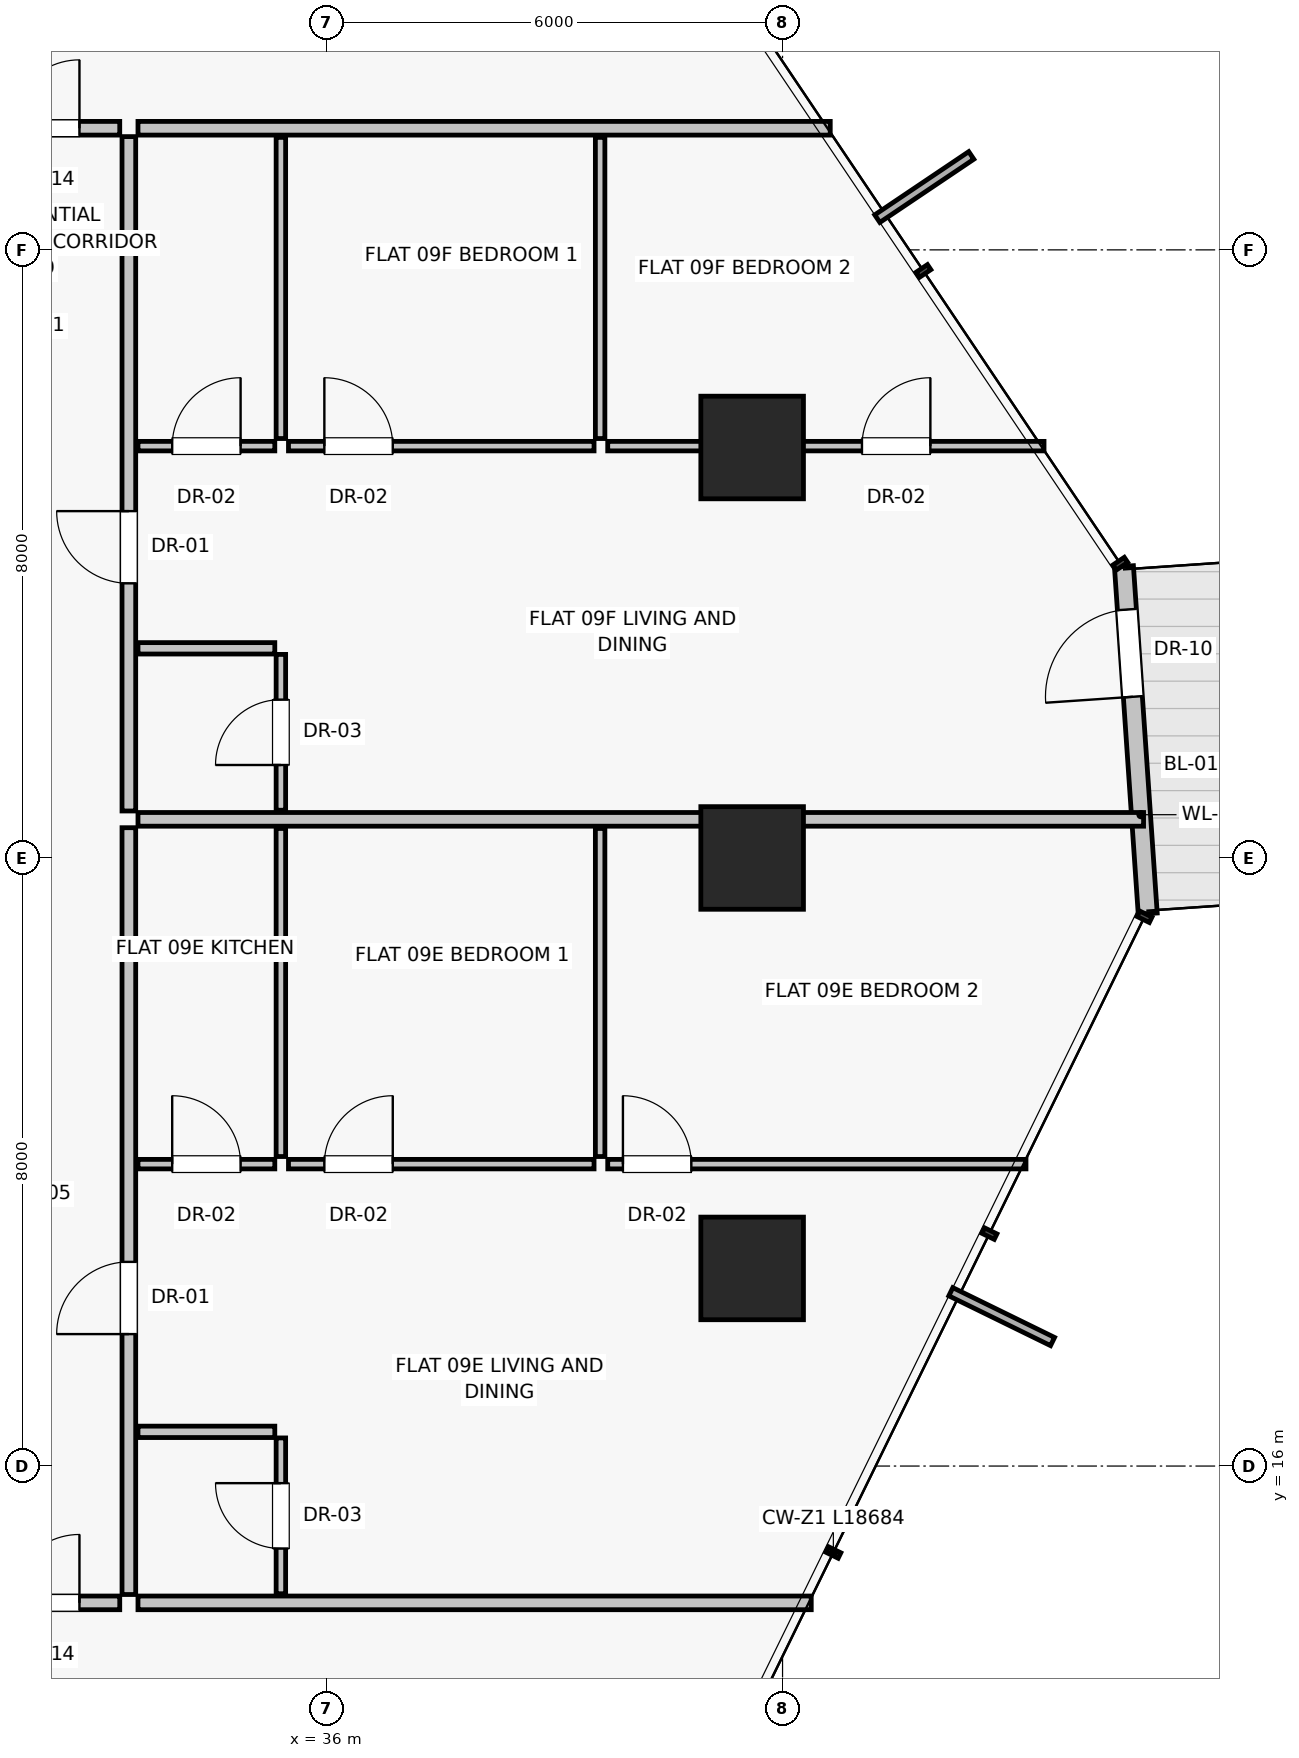
"""IFC4 building model, lengths in metres.
Left out: names, types, materials, properties, quantities, classifications, styles, units other than length and angle.
Written with IfcOpenShell. Run it as: python <this file> out.ifc"""

import sys

from ifc_helpers import new_model, si_unit, direction, frame, frame_2d, origin, origin_2d, place, context, subcontext, project, spatial, rectangle, extrude, source, transform, mapped, element, fill, save


model = new_model("IFC4")
c1 = context("Model", 3, precision=1e-05, world=origin(), true_north=direction((0.0, 1.0)))
c2 = subcontext(c1, "Body", "Model", "MODEL_VIEW")
j1 = project(units=[si_unit("LENGTHUNIT", "METRE"), si_unit("PLANEANGLEUNIT", "RADIAN")], contexts=[c1])
p1 = place(None, origin())
s1 = spatial("IfcSite", under=j1, at=p1, CompositionType="ELEMENT")
p2 = place(p1, origin())
s2 = spatial("IfcBuilding", under=s1, at=p2, CompositionType="ELEMENT")
p3 = place(p2, frame((0.0, 0.0, 37.05)))
s3 = spatial("IfcBuildingStorey", under=s2, at=p3, CompositionType="ELEMENT", Elevation=37.05)
for number, where, z_axis, x_axis in (
    (1, (41.6, 18.6, 0.0), (0.0, 0.0, 1.0), (1.0, 0.0, 0.0)),
    (2, (41.6, 24.0, 0.0), (0.0, 0.0, 1.0), (1.0, 0.0, 0.0)),
    (3, (41.6, 29.4, 0.0), (0.0, 0.0, 1.0), (1.0, 0.0, 0.0)),
):
    element("IfcColumn", number, at=place(p3, frame(where, z_axis=z_axis, x_axis=x_axis)), inside=s3, PredefinedType="COLUMN", context=c2, shape_type="SweptSolid", body=[
        extrude(rectangle(XDim=1.35, YDim=1.35, at=origin_2d()), origin(), (0.0, 0.0, 1.0), 3.25),
    ])
p4 = place(p3, frame((46.804, 23.267, 0.0), z_axis=(0.0, 0.0, 1.0), x_axis=(-0.068390469298, 0.99765863085, 0.0)))
e4 = element("IfcWall", 4, at=p4, inside=s3, PredefinedType="SOLIDWALL", context=c2, shape_type="SweptSolid", body=[
    extrude(rectangle(XDim=4.58, YDim=0.25, at=frame_2d((2.29, 0.0))), origin(), (0.0, 0.0, 1.0), 3.0),
])
p5 = place(p4, frame((2.86, 0.0, 0.0)))
e5 = element("IfcOpeningElement", 5, at=p5, cuts=e4, PredefinedType="OPENING", context=c2, shape_type="SweptSolid", body=[
    extrude(rectangle(XDim=1.15, YDim=2.25, at=frame_2d((0.575, 1.125))), frame((0.0, 0.135, 0.0), z_axis=(0.0, -1.0, 0.0), x_axis=(1.0, 0.0, 0.0)), (0.0, 0.0, 1.0), 0.27),
])
p6 = place(p3, frame((33.52, 14.2, 0.0), z_axis=(0.0, 0.0, 1.0), x_axis=(1.0, 0.0, 0.0)))
e6 = element("IfcWall", 6, at=p6, inside=s3, PredefinedType="PARTITIONING", context=c2, shape_type="SweptSolid", body=[
    extrude(rectangle(XDim=8.857, YDim=0.18, at=frame_2d((4.429, 0.0))), origin(), (0.0, 0.0, 1.0), 3.0),
])
p7 = place(p3, frame((33.52, 33.6, 0.0), z_axis=(0.0, 0.0, 1.0), x_axis=(1.0, 0.0, 0.0)))
e7 = element("IfcWall", 7, at=p7, inside=s3, PredefinedType="PARTITIONING", context=c2, shape_type="SweptSolid", body=[
    extrude(rectangle(XDim=9.107, YDim=0.18, at=frame_2d((4.554, 0.0))), origin(), (0.0, 0.0, 1.0), 3.0),
])
p8 = place(p3, frame((33.4, 14.31, 0.0), z_axis=(0.0, 0.0, 1.0), x_axis=(0.0, 1.0, 0.0)))
e8 = element("IfcWall", 8, at=p8, inside=s3, PredefinedType="PARTITIONING", context=c2, shape_type="SweptSolid", body=[
    extrude(rectangle(XDim=10.088, YDim=0.18, at=frame_2d((5.044, 0.0))), origin(), (0.0, 0.0, 1.0), 3.0),
])
p9 = place(p8, frame((3.426, 0.0, 0.0)))
e9 = element("IfcOpeningElement", 9, at=p9, cuts=e8, PredefinedType="OPENING", context=c2, shape_type="SweptSolid", body=[
    extrude(rectangle(XDim=0.95, YDim=2.02, at=frame_2d((0.475, 1.01))), frame((0.0, 0.1, 0.0), z_axis=(0.0, -1.0, 0.0), x_axis=(1.0, 0.0, 0.0)), (0.0, 0.0, 1.0), 0.2),
])
p10 = place(p3, frame((33.52, 16.45, 0.0), z_axis=(0.0, 0.0, 1.0), x_axis=(1.0, 0.0, 0.0)))
e10 = element("IfcWall", 10, at=p10, inside=s3, PredefinedType="PARTITIONING", context=c2, shape_type="SweptSolid", body=[
    extrude(rectangle(XDim=1.8, YDim=0.15, at=frame_2d((0.9, 0.0))), origin(), (0.0, 0.0, 1.0), 3.0),
])
p11 = place(p3, frame((35.4, 14.32, 0.0), z_axis=(0.0, 0.0, 1.0), x_axis=(0.0, 1.0, 0.0)))
e11 = element("IfcWall", 11, at=p11, inside=s3, PredefinedType="PARTITIONING", context=c2, shape_type="SweptSolid", body=[
    extrude(rectangle(XDim=2.05, YDim=0.125, at=frame_2d((1.025, 0.0))), origin(), (0.0, 0.0, 1.0), 3.0),
])
p12 = place(p11, frame((0.595, 0.0, 0.0)))
e12 = element("IfcOpeningElement", 12, at=p12, cuts=e11, PredefinedType="OPENING", context=c2, shape_type="SweptSolid", body=[
    extrude(rectangle(XDim=0.86, YDim=2.01, at=frame_2d((0.43, 1.005))), frame((0.0, 0.073, 0.0), z_axis=(0.0, -1.0, 0.0), x_axis=(1.0, 0.0, 0.0)), (0.0, 0.0, 1.0), 0.145),
])
p13 = place(p3, frame((33.52, 19.972, 0.0), z_axis=(0.0, 0.0, 1.0), x_axis=(1.0, 0.0, 0.0)))
e13 = element("IfcWall", 13, at=p13, inside=s3, PredefinedType="PARTITIONING", context=c2, shape_type="SweptSolid", body=[
    extrude(rectangle(XDim=1.8, YDim=0.125, at=frame_2d((0.9, 0.0))), origin(), (0.0, 0.0, 1.0), 3.0),
])
p14 = place(p13, frame((0.45, 0.0, 0.0)))
e14 = element("IfcOpeningElement", 14, at=p14, cuts=e13, PredefinedType="OPENING", context=c2, shape_type="SweptSolid", body=[
    extrude(rectangle(XDim=0.9, YDim=2.01, at=frame_2d((0.45, 1.005))), frame((0.0, 0.073, 0.0), z_axis=(0.0, -1.0, 0.0), x_axis=(1.0, 0.0, 0.0)), (0.0, 0.0, 1.0), 0.145),
])
for number, where, z_axis, x_axis in (
    (15, (35.4, 20.072, 0.0), (0.0, 0.0, 1.0), (0.0, 1.0, 0.0)),
    (16, (39.6, 20.072, 0.0), (0.0, 0.0, 1.0), (0.0, 1.0, 0.0)),
):
    element("IfcWall", number, at=place(p3, frame(where, z_axis=z_axis, x_axis=x_axis)), inside=s3, PredefinedType="PARTITIONING", context=c2, shape_type="SweptSolid", body=[
        extrude(rectangle(XDim=4.316, YDim=0.125, at=frame_2d((2.158, 0.0))), origin(), (0.0, 0.0, 1.0), 3.0),
    ])
p15 = place(p3, frame((35.5, 19.972, 0.0), z_axis=(0.0, 0.0, 1.0), x_axis=(1.0, 0.0, 0.0)))
e17 = element("IfcWall", 17, at=p15, inside=s3, PredefinedType="PARTITIONING", context=c2, shape_type="SweptSolid", body=[
    extrude(rectangle(XDim=4.02, YDim=0.125, at=frame_2d((2.01, 0.0))), origin(), (0.0, 0.0, 1.0), 3.0),
])
p16 = place(p15, frame((0.472, 0.0, 0.0)))
e18 = element("IfcOpeningElement", 18, at=p16, cuts=e17, PredefinedType="OPENING", context=c2, shape_type="SweptSolid", body=[
    extrude(rectangle(XDim=0.9, YDim=2.01, at=frame_2d((0.45, 1.005))), frame((0.0, 0.073, 0.0), z_axis=(0.0, -1.0, 0.0), x_axis=(1.0, 0.0, 0.0)), (0.0, 0.0, 1.0), 0.145),
])
p17 = place(p3, frame((39.7, 19.972, 0.0), z_axis=(0.0, 0.0, 1.0), x_axis=(1.0, 0.0, 0.0)))
e19 = element("IfcWall", 19, at=p17, inside=s3, PredefinedType="PARTITIONING", context=c2, shape_type="SweptSolid", body=[
    extrude(rectangle(XDim=5.503, YDim=0.125, at=frame_2d((2.751, 0.0))), origin(), (0.0, 0.0, 1.0), 3.0),
])
p18 = place(p17, frame((0.2, 0.0, 0.0)))
e20 = element("IfcOpeningElement", 20, at=p18, cuts=e19, PredefinedType="OPENING", context=c2, shape_type="SweptSolid", body=[
    extrude(rectangle(XDim=0.9, YDim=2.01, at=frame_2d((0.45, 1.005))), frame((0.0, 0.073, 0.0), z_axis=(0.0, -1.0, 0.0), x_axis=(1.0, 0.0, 0.0)), (0.0, 0.0, 1.0), 0.145),
])
p19 = place(p3, frame((33.52, 24.508, 0.0), z_axis=(0.0, 0.0, 1.0), x_axis=(1.0, 0.0, 0.0)))
e21 = element("IfcWall", 21, at=p19, inside=s3, PredefinedType="PARTITIONING", context=c2, shape_type="SweptSolid", body=[
    extrude(rectangle(XDim=13.229, YDim=0.18, at=frame_2d((6.615, 0.0))), origin(), (0.0, 0.0, 1.0), 3.0),
])
p20 = place(p3, frame((33.4, 24.618, 0.0), z_axis=(0.0, 0.0, 1.0), x_axis=(0.0, 1.0, 0.0)))
e22 = element("IfcWall", 22, at=p20, inside=s3, PredefinedType="PARTITIONING", context=c2, shape_type="SweptSolid", body=[
    extrude(rectangle(XDim=8.872, YDim=0.18, at=frame_2d((4.436, 0.0))), origin(), (0.0, 0.0, 1.0), 3.0),
])
p21 = place(p20, frame((2.995, 0.0, 0.0)))
e23 = element("IfcOpeningElement", 23, at=p21, cuts=e22, PredefinedType="OPENING", context=c2, shape_type="SweptSolid", body=[
    extrude(rectangle(XDim=0.95, YDim=2.02, at=frame_2d((0.475, 1.01))), frame((0.0, 0.1, 0.0), z_axis=(0.0, -1.0, 0.0), x_axis=(1.0, 0.0, 0.0)), (0.0, 0.0, 1.0), 0.2),
])
p22 = place(p3, frame((33.52, 26.758, 0.0), z_axis=(0.0, 0.0, 1.0), x_axis=(1.0, 0.0, 0.0)))
e24 = element("IfcWall", 24, at=p22, inside=s3, PredefinedType="PARTITIONING", context=c2, shape_type="SweptSolid", body=[
    extrude(rectangle(XDim=1.8, YDim=0.15, at=frame_2d((0.9, 0.0))), origin(), (0.0, 0.0, 1.0), 3.0),
])
p23 = place(p3, frame((35.4, 24.628, 0.0), z_axis=(0.0, 0.0, 1.0), x_axis=(0.0, 1.0, 0.0)))
e25 = element("IfcWall", 25, at=p23, inside=s3, PredefinedType="PARTITIONING", context=c2, shape_type="SweptSolid", body=[
    extrude(rectangle(XDim=2.05, YDim=0.125, at=frame_2d((1.025, 0.0))), origin(), (0.0, 0.0, 1.0), 3.0),
])
p24 = place(p23, frame((0.595, 0.0, 0.0)))
e26 = element("IfcOpeningElement", 26, at=p24, cuts=e25, PredefinedType="OPENING", context=c2, shape_type="SweptSolid", body=[
    extrude(rectangle(XDim=0.86, YDim=2.01, at=frame_2d((0.43, 1.005))), frame((0.0, 0.073, 0.0), z_axis=(0.0, -1.0, 0.0), x_axis=(1.0, 0.0, 0.0)), (0.0, 0.0, 1.0), 0.145),
])
p25 = place(p3, frame((33.52, 29.418, 0.0), z_axis=(0.0, 0.0, 1.0), x_axis=(1.0, 0.0, 0.0)))
e27 = element("IfcWall", 27, at=p25, inside=s3, PredefinedType="PARTITIONING", context=c2, shape_type="SweptSolid", body=[
    extrude(rectangle(XDim=1.8, YDim=0.125, at=frame_2d((0.9, 0.0))), origin(), (0.0, 0.0, 1.0), 3.0),
])
p26 = place(p25, frame((0.45, 0.0, 0.0)))
e28 = element("IfcOpeningElement", 28, at=p26, cuts=e27, PredefinedType="OPENING", context=c2, shape_type="SweptSolid", body=[
    extrude(rectangle(XDim=0.9, YDim=2.01, at=frame_2d((0.45, 1.005))), frame((0.0, 0.073, 0.0), z_axis=(0.0, -1.0, 0.0), x_axis=(1.0, 0.0, 0.0)), (0.0, 0.0, 1.0), 0.145),
])
for number, where, z_axis, x_axis in (
    (29, (35.4, 29.518, 0.0), (0.0, 0.0, 1.0), (0.0, 1.0, 0.0)),
    (30, (39.6, 29.518, 0.0), (0.0, 0.0, 1.0), (0.0, 1.0, 0.0)),
):
    element("IfcWall", number, at=place(p3, frame(where, z_axis=z_axis, x_axis=x_axis)), inside=s3, PredefinedType="PARTITIONING", context=c2, shape_type="SweptSolid", body=[
        extrude(rectangle(XDim=3.962, YDim=0.125, at=frame_2d((1.981, 0.0))), origin(), (0.0, 0.0, 1.0), 3.0),
    ])
p27 = place(p3, frame((35.5, 29.418, 0.0), z_axis=(0.0, 0.0, 1.0), x_axis=(1.0, 0.0, 0.0)))
e31 = element("IfcWall", 31, at=p27, inside=s3, PredefinedType="PARTITIONING", context=c2, shape_type="SweptSolid", body=[
    extrude(rectangle(XDim=4.02, YDim=0.125, at=frame_2d((2.01, 0.0))), origin(), (0.0, 0.0, 1.0), 2.299),
])
p28 = place(p27, frame((0.472, 0.0, 0.0)))
e32 = element("IfcOpeningElement", 32, at=p28, cuts=e31, PredefinedType="OPENING", context=c2, shape_type="SweptSolid", body=[
    extrude(rectangle(XDim=0.9, YDim=2.01, at=frame_2d((0.45, 1.005))), frame((0.0, 0.073, 0.0), z_axis=(0.0, -1.0, 0.0), x_axis=(1.0, 0.0, 0.0)), (0.0, 0.0, 1.0), 0.145),
])
p29 = place(p3, frame((39.7, 29.418, 0.0), z_axis=(0.0, 0.0, 1.0), x_axis=(1.0, 0.0, 0.0)))
e33 = element("IfcWall", 33, at=p29, inside=s3, PredefinedType="PARTITIONING", context=c2, shape_type="SweptSolid", body=[
    extrude(rectangle(XDim=5.74, YDim=0.125, at=frame_2d((2.87, 0.0))), origin(), (0.0, 0.0, 1.0), 2.299),
])
p30 = place(p29, frame((3.345, 0.0, 0.0)))
e34 = element("IfcOpeningElement", 34, at=p30, cuts=e33, PredefinedType="OPENING", context=c2, shape_type="SweptSolid", body=[
    extrude(rectangle(XDim=0.9, YDim=2.01, at=frame_2d((0.45, 1.005))), frame((0.0, 0.073, 0.0), z_axis=(0.0, -1.0, 0.0), x_axis=(1.0, 0.0, 0.0)), (0.0, 0.0, 1.0), 0.145),
])
p31 = place(p3, frame((31.32, 14.2, 0.0), z_axis=(0.0, 0.0, 1.0), x_axis=(1.0, 0.0, 0.0)))
e35 = element("IfcWall", 35, at=p31, inside=s3, PredefinedType="PARTITIONING", context=c2, shape_type="SweptSolid", body=[
    extrude(rectangle(XDim=1.96, YDim=0.18, at=frame_2d((0.98, 0.0))), origin(), (0.0, 0.0, 1.0), 3.0),
])
p32 = place(p31, frame((0.53, 0.0, 0.0)))
e36 = element("IfcOpeningElement", 36, at=p32, cuts=e35, PredefinedType="OPENING", context=c2, shape_type="SweptSolid", body=[
    extrude(rectangle(XDim=0.9, YDim=2.01, at=frame_2d((0.45, 1.005))), frame((0.0, 0.1, 0.0), z_axis=(0.0, -1.0, 0.0), x_axis=(1.0, 0.0, 0.0)), (0.0, 0.0, 1.0), 0.2),
])
p33 = place(p3, frame((31.32, 33.6, 0.0), z_axis=(0.0, 0.0, 1.0), x_axis=(1.0, 0.0, 0.0)))
e37 = element("IfcWall", 37, at=p33, inside=s3, PredefinedType="PARTITIONING", context=c2, shape_type="SweptSolid", body=[
    extrude(rectangle(XDim=1.96, YDim=0.18, at=frame_2d((0.98, 0.0))), origin(), (0.0, 0.0, 1.0), 3.0),
])
p34 = place(p33, frame((0.53, 0.0, 0.0)))
e38 = element("IfcOpeningElement", 38, at=p34, cuts=e37, PredefinedType="OPENING", context=c2, shape_type="SweptSolid", body=[
    extrude(rectangle(XDim=0.9, YDim=2.01, at=frame_2d((0.45, 1.005))), frame((0.0, 0.1, 0.0), z_axis=(0.0, -1.0, 0.0), x_axis=(1.0, 0.0, 0.0)), (0.0, 0.0, 1.0), 0.2),
])
m1 = source(origin(), c2, "Body", "SweptSolid", [
    extrude(rectangle(XDim=1.15, YDim=2.25, at=frame_2d((0.575, 1.125))), frame((0.0, 0.025, 0.0), z_axis=(0.0, -1.0, 0.0), x_axis=(1.0, 0.0, 0.0)), (0.0, 0.0, 1.0), 0.05),
])
p35 = place(p5, frame((1.15, 0.0, 0.0), z_axis=(0.0, 0.0, 1.0), x_axis=(-1.0, 0.0, 0.0)))
e39 = element("IfcDoor", 39, at=p35, inside=s3, OperationType="SINGLE_SWING_LEFT", PredefinedType="DOOR", context=c2, shape_type="MappedRepresentation", body=[
    mapped(m1, transform((0.0, 0.0, 0.0), scale=1.0)),
])
fill(e5, e39)
m2 = source(origin(), c2, "Body", "SweptSolid", [
    extrude(rectangle(XDim=0.95, YDim=2.02, at=frame_2d((0.475, 1.01))), frame((0.0, 0.025, 0.0), z_axis=(0.0, -1.0, 0.0), x_axis=(1.0, 0.0, 0.0)), (0.0, 0.0, 1.0), 0.05),
])
p36 = place(p9, origin())
e40 = element("IfcDoor", 40, at=p36, inside=s3, OperationType="SINGLE_SWING_LEFT", PredefinedType="DOOR", context=c2, shape_type="MappedRepresentation", body=[
    mapped(m2, transform((0.0, 0.0, 0.0), scale=1.0)),
])
fill(e9, e40)
m3 = source(origin(), c2, "Body", "SweptSolid", [
    extrude(rectangle(XDim=0.86, YDim=2.01, at=frame_2d((0.43, 1.005))), frame((0.0, 0.025, 0.0), z_axis=(0.0, -1.0, 0.0), x_axis=(1.0, 0.0, 0.0)), (0.0, 0.0, 1.0), 0.05),
])
p37 = place(p12, origin())
e41 = element("IfcDoor", 41, at=p37, inside=s3, OperationType="SINGLE_SWING_RIGHT", PredefinedType="DOOR", context=c2, shape_type="MappedRepresentation", body=[
    mapped(m3, transform((0.0, 0.0, 0.0), scale=1.0)),
])
fill(e12, e41)
m4 = source(origin(), c2, "Body", "SweptSolid", [
    extrude(rectangle(XDim=0.9, YDim=2.01, at=frame_2d((0.45, 1.005))), frame((0.0, 0.025, 0.0), z_axis=(0.0, -1.0, 0.0), x_axis=(1.0, 0.0, 0.0)), (0.0, 0.0, 1.0), 0.05),
])
p38 = place(p14, origin())
e42 = element("IfcDoor", 42, at=p38, inside=s3, OperationType="SINGLE_SWING_LEFT", PredefinedType="DOOR", context=c2, shape_type="MappedRepresentation", body=[
    mapped(m4, transform((0.0, 0.0, 0.0), scale=1.0)),
])
fill(e14, e42)
p39 = place(p16, origin())
e43 = element("IfcDoor", 43, at=p39, inside=s3, OperationType="SINGLE_SWING_RIGHT", PredefinedType="DOOR", context=c2, shape_type="MappedRepresentation", body=[
    mapped(m4, transform((0.0, 0.0, 0.0), scale=1.0)),
])
fill(e18, e43)
p40 = place(p18, origin())
e44 = element("IfcDoor", 44, at=p40, inside=s3, OperationType="SINGLE_SWING_LEFT", PredefinedType="DOOR", context=c2, shape_type="MappedRepresentation", body=[
    mapped(m4, transform((0.0, 0.0, 0.0), scale=1.0)),
])
fill(e20, e44)
p41 = place(p21, origin())
e45 = element("IfcDoor", 45, at=p41, inside=s3, OperationType="SINGLE_SWING_RIGHT", PredefinedType="DOOR", context=c2, shape_type="MappedRepresentation", body=[
    mapped(m2, transform((0.0, 0.0, 0.0), scale=1.0)),
])
fill(e23, e45)
p42 = place(p24, origin())
e46 = element("IfcDoor", 46, at=p42, inside=s3, OperationType="SINGLE_SWING_LEFT", PredefinedType="DOOR", context=c2, shape_type="MappedRepresentation", body=[
    mapped(m3, transform((0.0, 0.0, 0.0), scale=1.0)),
])
fill(e26, e46)
p43 = place(p26, origin())
e47 = element("IfcDoor", 47, at=p43, inside=s3, OperationType="SINGLE_SWING_RIGHT", PredefinedType="DOOR", context=c2, shape_type="MappedRepresentation", body=[
    mapped(m4, transform((0.0, 0.0, 0.0), scale=1.0)),
])
fill(e28, e47)
p44 = place(p28, origin())
e48 = element("IfcDoor", 48, at=p44, inside=s3, OperationType="SINGLE_SWING_LEFT", PredefinedType="DOOR", context=c2, shape_type="MappedRepresentation", body=[
    mapped(m4, transform((0.0, 0.0, 0.0), scale=1.0)),
])
fill(e32, e48)
p45 = place(p30, origin())
e49 = element("IfcDoor", 49, at=p45, inside=s3, OperationType="SINGLE_SWING_RIGHT", PredefinedType="DOOR", context=c2, shape_type="MappedRepresentation", body=[
    mapped(m4, transform((0.0, 0.0, 0.0), scale=1.0)),
])
fill(e34, e49)
p46 = place(p32, origin())
e50 = element("IfcDoor", 50, at=p46, inside=s3, OperationType="SINGLE_SWING_RIGHT", PredefinedType="DOOR", context=c2, shape_type="MappedRepresentation", body=[
    mapped(m4, transform((0.0, 0.0, 0.0), scale=1.0)),
])
fill(e36, e50)
p47 = place(p34, origin())
e51 = element("IfcDoor", 51, at=p47, inside=s3, OperationType="SINGLE_SWING_RIGHT", PredefinedType="DOOR", context=c2, shape_type="MappedRepresentation", body=[
    mapped(m4, transform((0.0, 0.0, 0.0), scale=1.0)),
])
fill(e38, e51)
save(model, sys.argv[1])
